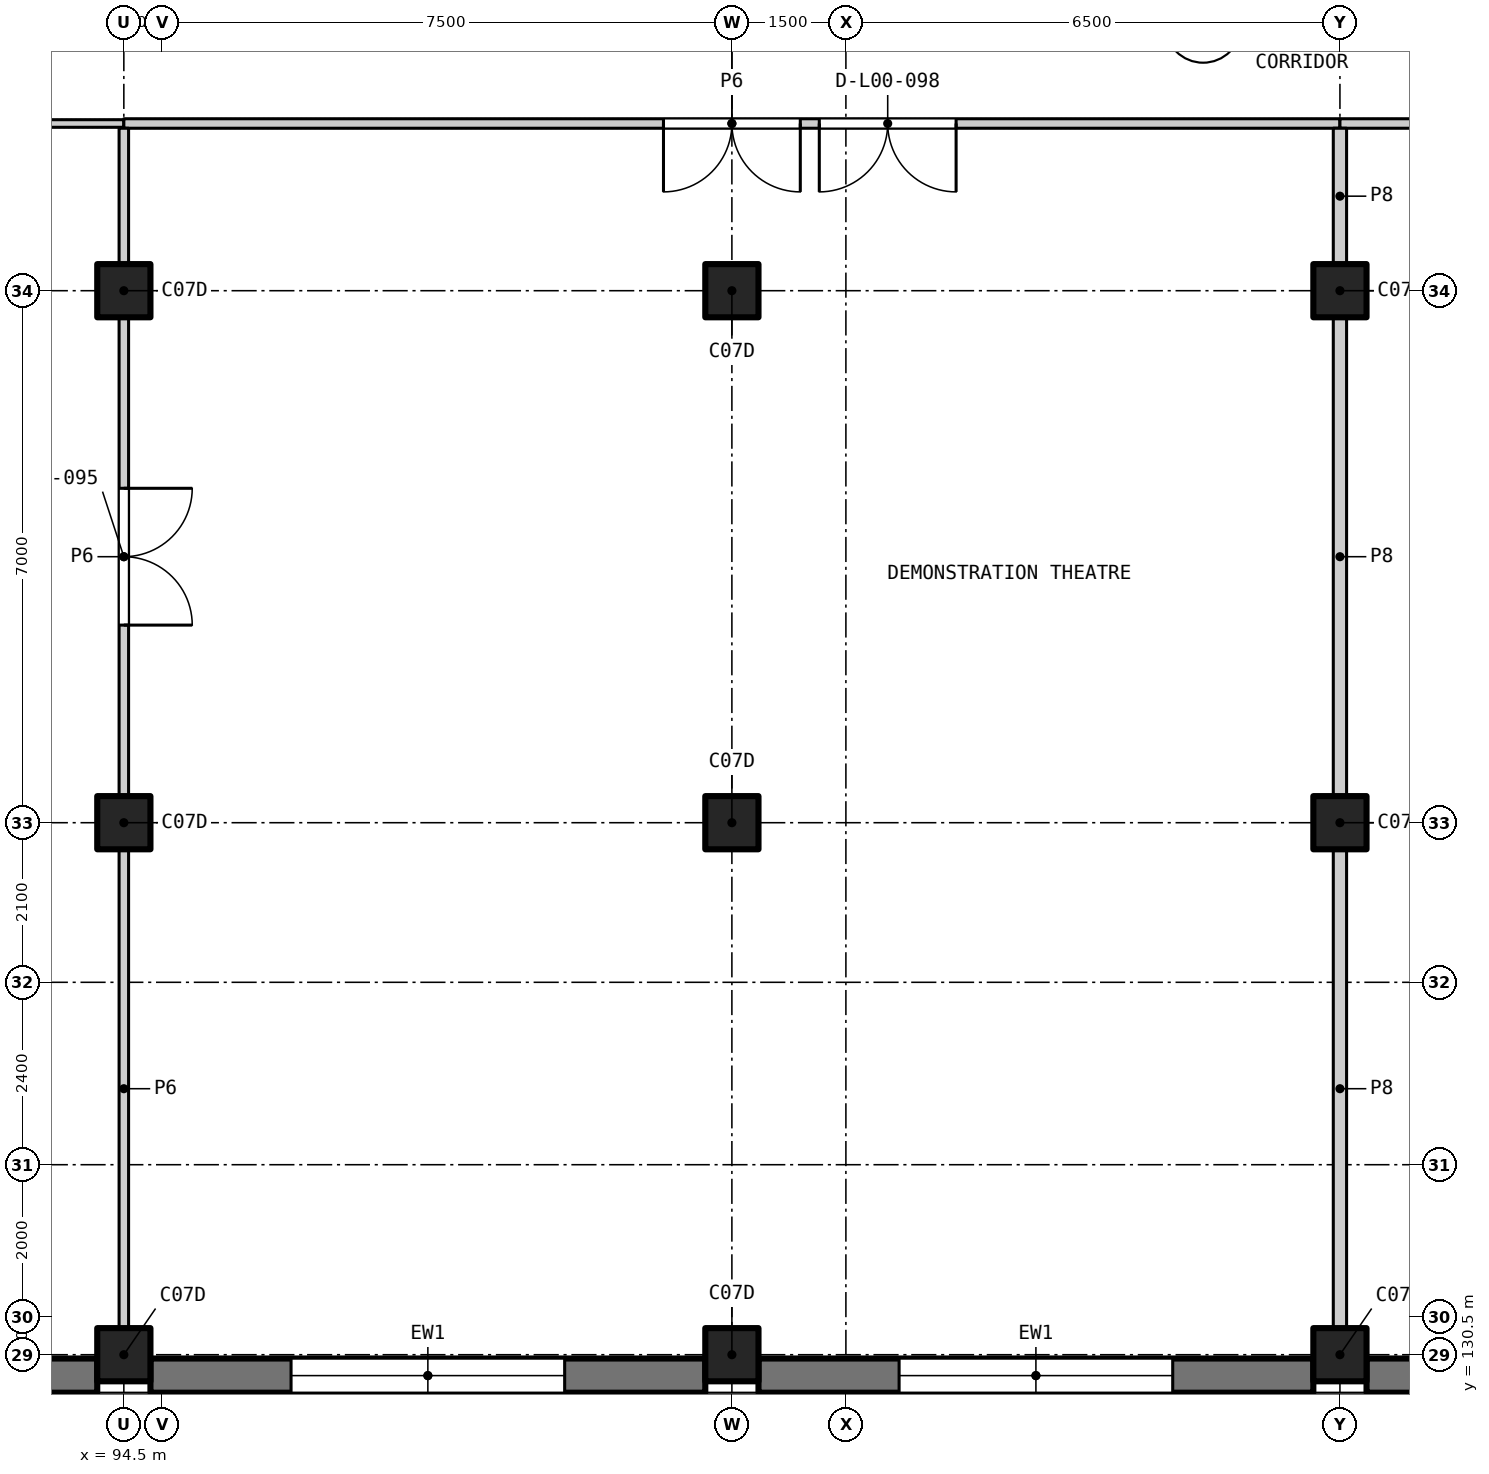
"""IFC4 building model, lengths in metres.
Left out: names, types, materials, properties, quantities, classifications, styles, units other than length and angle.
Written with IfcOpenShell. Run it as: python <this file> out.ifc"""

import sys

from ifc_helpers import new_model, si_unit, direction, frame, frame_2d, origin, origin_2d, place, context, subcontext, project, spatial, rectangle, extrude, element, fill, save


model = new_model("IFC4")
c1 = context("Model", 3, precision=1e-05, world=origin(), true_north=direction((0.0, 1.0)))
c2 = subcontext(c1, "Body", "Model", "MODEL_VIEW")
j1 = project(units=[si_unit("LENGTHUNIT", "METRE"), si_unit("PLANEANGLEUNIT", "RADIAN")], contexts=[c1])
p1 = place(None, origin())
s1 = spatial("IfcSite", under=j1, at=p1, CompositionType="ELEMENT")
p2 = place(p1, origin())
s2 = spatial("IfcBuilding", under=s1, at=p2, CompositionType="ELEMENT")
p3 = place(p2, origin())
s3 = spatial("IfcBuildingStorey", under=s2, at=p3, CompositionType="ELEMENT", Elevation=0.0)
for number, where, z_axis, x_axis in (
    (1, (94.5, 130.5, -1.4), (0.0, 0.0, 1.0), (1.0, 0.0, 0.0)),
    (2, (94.5, 137.5, -1.4), (0.0, 0.0, 1.0), (1.0, 0.0, 0.0)),
    (3, (94.5, 144.5, -1.4), (0.0, 0.0, 1.0), (1.0, 0.0, 0.0)),
    (4, (102.5, 130.5, -1.4), (0.0, 0.0, 1.0), (1.0, 0.0, 0.0)),
    (5, (102.5, 137.5, -1.4), (0.0, 0.0, 1.0), (1.0, 0.0, 0.0)),
    (6, (102.5, 144.5, -1.4), (0.0, 0.0, 1.0), (1.0, 0.0, 0.0)),
    (7, (110.5, 130.5, -1.4), (0.0, 0.0, 1.0), (1.0, 0.0, 0.0)),
    (8, (110.5, 137.5, -1.4), (0.0, 0.0, 1.0), (1.0, 0.0, 0.0)),
    (9, (110.5, 144.5, -1.4), (0.0, 0.0, 1.0), (1.0, 0.0, 0.0)),
):
    element("IfcColumn", number, at=place(p3, frame(where, z_axis=z_axis, x_axis=x_axis)), inside=s3, PredefinedType="COLUMN", context=c2, shape_type="SweptSolid", body=[
        extrude(rectangle(XDim=0.7, YDim=0.7, at=origin_2d()), origin(), (0.0, 0.0, 1.0), 7.4),
    ])
p4 = place(p3, frame((94.15, 130.225, 0.0), z_axis=(0.0, 0.0, 1.0), x_axis=(-1.0, 0.0, 0.0)))
e10 = element("IfcWall", 10, at=p4, inside=s3, PredefinedType="SOLIDWALL", context=c2, shape_type="SweptSolid", body=[
    extrude(rectangle(XDim=7.3, YDim=0.45, at=frame_2d((3.65, 0.0))), origin(), (0.0, 0.0, 1.0), 4.9),
])
p5 = place(p4, frame((1.85, 0.0, 0.9)))
e11 = element("IfcOpeningElement", 11, at=p5, cuts=e10, PredefinedType="OPENING", context=c2, shape_type="SweptSolid", body=[
    extrude(rectangle(XDim=3.6, YDim=1.6, at=frame_2d((1.8, 0.8))), frame((0.0, 0.235, 0.0), z_axis=(0.0, -1.0, 0.0), x_axis=(1.0, 0.0, 0.0)), (0.0, 0.0, 1.0), 0.47),
])
p6 = place(p3, frame((102.15, 130.225, 0.0), z_axis=(0.0, 0.0, 1.0), x_axis=(-1.0, 0.0, 0.0)))
e12 = element("IfcWall", 12, at=p6, inside=s3, PredefinedType="SOLIDWALL", context=c2, shape_type="SweptSolid", body=[
    extrude(rectangle(XDim=7.3, YDim=0.45, at=frame_2d((3.65, 0.0))), origin(), (0.0, 0.0, 1.0), 4.9),
])
p7 = place(p6, frame((1.85, 0.0, 0.9)))
e13 = element("IfcOpeningElement", 13, at=p7, cuts=e12, PredefinedType="OPENING", context=c2, shape_type="SweptSolid", body=[
    extrude(rectangle(XDim=3.6, YDim=1.6, at=frame_2d((1.8, 0.8))), frame((0.0, 0.235, 0.0), z_axis=(0.0, -1.0, 0.0), x_axis=(1.0, 0.0, 0.0)), (0.0, 0.0, 1.0), 0.47),
])
p8 = place(p3, frame((110.15, 130.225, 0.0), z_axis=(0.0, 0.0, 1.0), x_axis=(-1.0, 0.0, 0.0)))
e14 = element("IfcWall", 14, at=p8, inside=s3, PredefinedType="SOLIDWALL", context=c2, shape_type="SweptSolid", body=[
    extrude(rectangle(XDim=7.3, YDim=0.45, at=frame_2d((3.65, 0.0))), origin(), (0.0, 0.0, 1.0), 4.9),
])
p9 = place(p8, frame((1.85, 0.0, 0.9)))
e15 = element("IfcOpeningElement", 15, at=p9, cuts=e14, PredefinedType="OPENING", context=c2, shape_type="SweptSolid", body=[
    extrude(rectangle(XDim=3.6, YDim=1.6, at=frame_2d((1.8, 0.8))), frame((0.0, 0.235, 0.0), z_axis=(0.0, -1.0, 0.0), x_axis=(1.0, 0.0, 0.0)), (0.0, 0.0, 1.0), 0.47),
])
p10 = place(p3, frame((118.15, 130.225, 0.0), z_axis=(0.0, 0.0, 1.0), x_axis=(-1.0, 0.0, 0.0)))
e16 = element("IfcWall", 16, at=p10, inside=s3, PredefinedType="SOLIDWALL", context=c2, shape_type="SweptSolid", body=[
    extrude(rectangle(XDim=7.3, YDim=0.45, at=frame_2d((3.65, 0.0))), origin(), (0.0, 0.0, 1.0), 4.9),
])
p11 = place(p10, frame((1.85, 0.0, 0.9)))
e17 = element("IfcOpeningElement", 17, at=p11, cuts=e16, PredefinedType="OPENING", context=c2, shape_type="SweptSolid", body=[
    extrude(rectangle(XDim=3.6, YDim=1.6, at=frame_2d((1.8, 0.8))), frame((0.0, 0.235, 0.0), z_axis=(0.0, -1.0, 0.0), x_axis=(1.0, 0.0, 0.0)), (0.0, 0.0, 1.0), 0.47),
])
p12 = place(p3, frame((86.45, 146.7, 0.0), z_axis=(0.0, 0.0, 1.0), x_axis=(1.0, 0.0, 0.0)))
e18 = element("IfcWall", 18, at=p12, inside=s3, PredefinedType="PARTITIONING", context=c2, shape_type="SweptSolid", body=[
    extrude(rectangle(XDim=8.05, YDim=0.1, at=frame_2d((4.025, 0.0))), origin(), (0.0, 0.0, 1.0), 5.7),
])
p13 = place(p12, frame((3.15, 0.0, 0.0)))
e19 = element("IfcOpeningElement", 19, at=p13, cuts=e18, PredefinedType="OPENING", context=c2, shape_type="SweptSolid", body=[
    extrude(rectangle(XDim=1.8, YDim=2.1, at=frame_2d((0.9, 1.05))), frame((0.0, 0.06, 0.0), z_axis=(0.0, -1.0, 0.0), x_axis=(1.0, 0.0, 0.0)), (0.0, 0.0, 1.0), 0.12),
])
p14 = place(p3, frame((94.5, 146.7, 0.0), z_axis=(0.0, 0.0, 1.0), x_axis=(1.0, 0.0, 0.0)))
e20 = element("IfcWall", 20, at=p14, inside=s3, PredefinedType="PARTITIONING", context=c2, shape_type="SweptSolid", body=[
    extrude(rectangle(XDim=16.0, YDim=0.125, at=frame_2d((8.0, 0.0))), origin(), (0.0, 0.0, 1.0), 5.7),
])
p15 = place(p14, frame((7.1, 0.0, 0.0)))
e21 = element("IfcOpeningElement", 21, at=p15, cuts=e20, PredefinedType="OPENING", context=c2, shape_type="SweptSolid", body=[
    extrude(rectangle(XDim=1.8, YDim=2.1, at=frame_2d((0.9, 1.05))), frame((0.0, 0.073, 0.0), z_axis=(0.0, -1.0, 0.0), x_axis=(1.0, 0.0, 0.0)), (0.0, 0.0, 1.0), 0.145),
])
p16 = place(p14, frame((9.15, 0.0, 0.0)))
e22 = element("IfcOpeningElement", 22, at=p16, cuts=e20, PredefinedType="OPENING", context=c2, shape_type="SweptSolid", body=[
    extrude(rectangle(XDim=1.8, YDim=2.1, at=frame_2d((0.9, 1.05))), frame((0.0, 0.073, 0.0), z_axis=(0.0, -1.0, 0.0), x_axis=(1.0, 0.0, 0.0)), (0.0, 0.0, 1.0), 0.145),
])
p17 = place(p3, frame((110.5, 146.7, 0.0), z_axis=(0.0, 0.0, 1.0), x_axis=(1.0, 0.0, 0.0)))
e23 = element("IfcWall", 23, at=p17, inside=s3, PredefinedType="PARTITIONING", context=c2, shape_type="SweptSolid", body=[
    extrude(rectangle(XDim=8.0, YDim=0.125, at=frame_2d((4.0, 0.0))), origin(), (0.0, 0.0, 1.0), 5.7),
])
p18 = place(p17, frame((3.5, 0.0, 0.0)))
e24 = element("IfcOpeningElement", 24, at=p18, cuts=e23, PredefinedType="OPENING", context=c2, shape_type="SweptSolid", body=[
    extrude(rectangle(XDim=1.0, YDim=2.1, at=frame_2d((0.5, 1.05))), frame((0.0, 0.073, 0.0), z_axis=(0.0, -1.0, 0.0), x_axis=(1.0, 0.0, 0.0)), (0.0, 0.0, 1.0), 0.145),
])
p19 = place(p3, frame((94.5, 130.85, 0.0), z_axis=(0.0, 0.0, 1.0), x_axis=(0.0, 1.0, 0.0)))
e25 = element("IfcWall", 25, at=p19, inside=s3, PredefinedType="PARTITIONING", context=c2, shape_type="SweptSolid", body=[
    extrude(rectangle(XDim=6.3, YDim=0.125, at=frame_2d((3.15, 0.0))), origin(), (0.0, 0.0, 1.0), 5.0),
])
p20 = place(p3, frame((94.5, 137.85, 0.0), z_axis=(0.0, 0.0, 1.0), x_axis=(0.0, 1.0, 0.0)))
e26 = element("IfcWall", 26, at=p20, inside=s3, PredefinedType="PARTITIONING", context=c2, shape_type="SweptSolid", body=[
    extrude(rectangle(XDim=6.3, YDim=0.125, at=frame_2d((3.15, 0.0))), origin(), (0.0, 0.0, 1.0), 5.0),
])
p21 = place(p20, frame((2.25, 0.0, 0.0)))
e27 = element("IfcOpeningElement", 27, at=p21, cuts=e26, PredefinedType="OPENING", context=c2, shape_type="SweptSolid", body=[
    extrude(rectangle(XDim=1.8, YDim=2.1, at=frame_2d((0.9, 1.05))), frame((0.0, 0.073, 0.0), z_axis=(0.0, -1.0, 0.0), x_axis=(1.0, 0.0, 0.0)), (0.0, 0.0, 1.0), 0.145),
])
p22 = place(p3, frame((94.5, 144.85, 0.0), z_axis=(0.0, 0.0, 1.0), x_axis=(0.0, 1.0, 0.0)))
e28 = element("IfcWall", 28, at=p22, inside=s3, PredefinedType="PARTITIONING", context=c2, shape_type="SweptSolid", body=[
    extrude(rectangle(XDim=1.787, YDim=0.125, at=frame_2d((0.894, 0.0))), origin(), (0.0, 0.0, 1.0), 5.0),
])
for number, where, z_axis, x_axis in (
    (29, (110.5, 130.85, 0.0), (0.0, 0.0, 1.0), (0.0, 1.0, 0.0)),
    (30, (110.5, 137.85, 0.0), (0.0, 0.0, 1.0), (0.0, 1.0, 0.0)),
):
    element("IfcWall", number, at=place(p3, frame(where, z_axis=z_axis, x_axis=x_axis)), inside=s3, PredefinedType="PARTITIONING", context=c2, shape_type="SweptSolid", body=[
        extrude(rectangle(XDim=6.3, YDim=0.175, at=frame_2d((3.15, 0.0))), origin(), (0.0, 0.0, 1.0), 5.0),
    ])
p23 = place(p3, frame((110.5, 144.85, 0.0), z_axis=(0.0, 0.0, 1.0), x_axis=(0.0, 1.0, 0.0)))
e31 = element("IfcWall", 31, at=p23, inside=s3, PredefinedType="PARTITIONING", context=c2, shape_type="SweptSolid", body=[
    extrude(rectangle(XDim=1.787, YDim=0.175, at=frame_2d((0.894, 0.0))), origin(), (0.0, 0.0, 1.0), 5.0),
])
p24 = place(p7, origin())
e32 = element("IfcWindow", 32, at=p24, inside=s3, PartitioningType="SINGLE_PANEL", PredefinedType="WINDOW", context=c2, shape_type="SweptSolid", body=[
    extrude(rectangle(XDim=3.6, YDim=1.6, at=frame_2d((1.8, 0.8))), frame((0.0, -0.125, 0.0), z_axis=(0.0, -1.0, 0.0), x_axis=(1.0, 0.0, 0.0)), (0.0, 0.0, 1.0), 0.06),
])
fill(e13, e32)
p25 = place(p9, origin())
e33 = element("IfcWindow", 33, at=p25, inside=s3, PartitioningType="SINGLE_PANEL", PredefinedType="WINDOW", context=c2, shape_type="SweptSolid", body=[
    extrude(rectangle(XDim=3.6, YDim=1.6, at=frame_2d((1.8, 0.8))), frame((0.0, -0.125, 0.0), z_axis=(0.0, -1.0, 0.0), x_axis=(1.0, 0.0, 0.0)), (0.0, 0.0, 1.0), 0.06),
])
fill(e15, e33)
p26 = place(p21, frame((1.8, 0.0, 0.0), z_axis=(0.0, 0.0, 1.0), x_axis=(-1.0, 0.0, 0.0)))
e34 = element("IfcDoor", 34, at=p26, inside=s3, OperationType="DOUBLE_DOOR_SINGLE_SWING", PredefinedType="DOOR", context=c2, shape_type="SweptSolid", body=[
    extrude(rectangle(XDim=1.8, YDim=2.1, at=frame_2d((0.9, 1.05))), frame((0.0, 0.025, 0.0), z_axis=(0.0, -1.0, 0.0), x_axis=(1.0, 0.0, 0.0)), (0.0, 0.0, 1.0), 0.05),
])
fill(e27, e34)
p27 = place(p15, frame((1.8, 0.0, 0.0), z_axis=(0.0, 0.0, 1.0), x_axis=(-1.0, 0.0, 0.0)))
e35 = element("IfcDoor", 35, at=p27, inside=s3, OperationType="DOUBLE_DOOR_SINGLE_SWING", PredefinedType="DOOR", context=c2, shape_type="SweptSolid", body=[
    extrude(rectangle(XDim=1.8, YDim=2.1, at=frame_2d((0.9, 1.05))), frame((0.0, 0.025, 0.0), z_axis=(0.0, -1.0, 0.0), x_axis=(1.0, 0.0, 0.0)), (0.0, 0.0, 1.0), 0.05),
])
fill(e21, e35)
p28 = place(p16, frame((1.8, 0.0, 0.0), z_axis=(0.0, 0.0, 1.0), x_axis=(-1.0, 0.0, 0.0)))
e36 = element("IfcDoor", 36, at=p28, inside=s3, OperationType="DOUBLE_DOOR_SINGLE_SWING", PredefinedType="DOOR", context=c2, shape_type="SweptSolid", body=[
    extrude(rectangle(XDim=1.8, YDim=2.1, at=frame_2d((0.9, 1.05))), frame((0.0, 0.025, 0.0), z_axis=(0.0, -1.0, 0.0), x_axis=(1.0, 0.0, 0.0)), (0.0, 0.0, 1.0), 0.05),
])
fill(e22, e36)
save(model, sys.argv[1])
